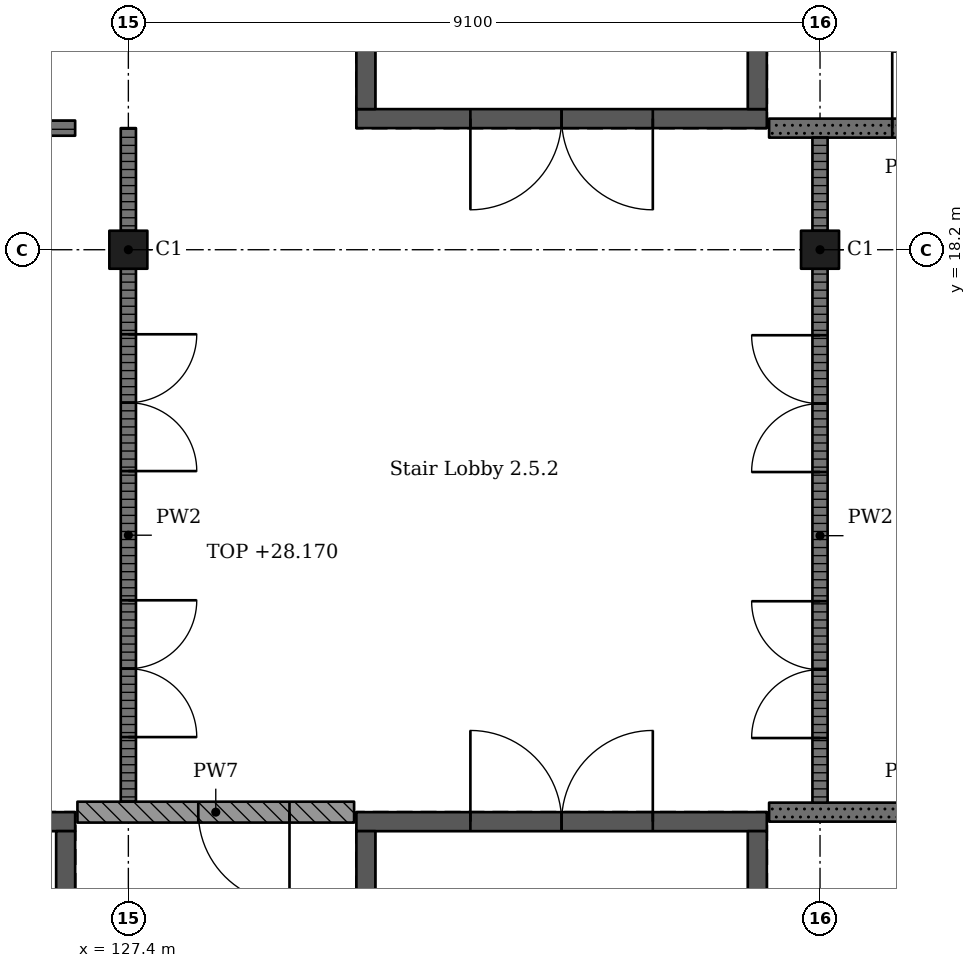
"""IFC4 building model, lengths in metres.
Left out: names, types, materials, properties, quantities, classifications, styles, units other than length and angle.
Written with IfcOpenShell. Run it as: python <this file> out.ifc"""

import sys

from ifc_helpers import new_model, si_unit, direction, frame, frame_2d, origin, origin_2d, place, context, subcontext, project, spatial, rectangle, extrude, element, fill, save


model = new_model("IFC4")
c1 = context("Model", 3, precision=1e-05, world=origin(), true_north=direction((0.0, 1.0)))
c2 = subcontext(c1, "Body", "Model", "MODEL_VIEW")
j1 = project(units=[si_unit("LENGTHUNIT", "METRE"), si_unit("PLANEANGLEUNIT", "RADIAN")], contexts=[c1])
p1 = place(None, origin())
s1 = spatial("IfcSite", under=j1, at=p1, CompositionType="ELEMENT")
p2 = place(p1, origin())
s2 = spatial("IfcBuilding", under=s1, at=p2, CompositionType="ELEMENT")
p3 = place(p2, frame((0.0, 0.0, 24.57)))
s3 = spatial("IfcBuildingStorey", under=s2, at=p3, CompositionType="ELEMENT", Elevation=24.57)
for number, where, z_axis, x_axis in (
    (1, (127.4, 18.2, 0.0), (0.0, 0.0, 1.0), (1.0, 0.0, 0.0)),
    (2, (136.5, 18.2, 0.0), (0.0, 0.0, 1.0), (1.0, 0.0, 0.0)),
):
    element("IfcColumn", number, at=place(p3, frame(where, z_axis=z_axis, x_axis=x_axis)), inside=s3, PredefinedType="COLUMN", context=c2, shape_type="SweptSolid", body=[
        extrude(rectangle(XDim=0.5, YDim=0.5, at=origin_2d()), origin(), (0.0, 0.0, 1.0), 4.55),
    ])
p4 = place(p3, frame((135.8, 10.675, 0.0), z_axis=(0.0, 0.0, 1.0), x_axis=(-1.0, 0.0, 0.0)))
e3 = element("IfcWall", 3, at=p4, inside=s3, PredefinedType="SHEAR", context=c2, shape_type="SweptSolid", body=[
    extrude(rectangle(XDim=5.4, YDim=0.25, at=frame_2d((2.7, 0.0))), origin(), (0.0, 0.0, 1.0), 4.55),
])
p5 = place(p4, frame((1.5, 0.0, 0.0)))
e4 = element("IfcOpeningElement", 4, at=p5, cuts=e3, PredefinedType="OPENING", context=c2, shape_type="SweptSolid", body=[
    extrude(rectangle(XDim=2.4, YDim=2.1, at=frame_2d((1.2, 1.05))), frame((0.0, 0.135, 0.0), z_axis=(0.0, -1.0, 0.0), x_axis=(1.0, 0.0, 0.0)), (0.0, 0.0, 1.0), 0.27),
])
for number, where, z_axis, x_axis in (
    (5, (130.525, 10.55, 0.0), (0.0, 0.0, 1.0), (0.0, -1.0, 0.0)),
    (6, (135.675, 10.55, 0.0), (0.0, 0.0, 1.0), (0.0, -1.0, 0.0)),
):
    element("IfcWall", number, at=place(p3, frame(where, z_axis=z_axis, x_axis=x_axis)), inside=s3, PredefinedType="SHEAR", context=c2, shape_type="SweptSolid", body=[
        extrude(rectangle(XDim=9.6, YDim=0.25, at=frame_2d((4.8, 0.0))), origin(), (0.0, 0.0, 1.0), 4.55),
    ])
p6 = place(p3, frame((126.7, 10.675, 0.0), z_axis=(0.0, 0.0, 1.0), x_axis=(-1.0, 0.0, 0.0)))
e7 = element("IfcWall", 7, at=p6, inside=s3, PredefinedType="SHEAR", context=c2, shape_type="SweptSolid", body=[
    extrude(rectangle(XDim=5.4, YDim=0.25, at=frame_2d((2.7, 0.0))), origin(), (0.0, 0.0, 1.0), 4.55),
])
p7 = place(p6, frame((1.5, 0.0, 0.0)))
e8 = element("IfcOpeningElement", 8, at=p7, cuts=e7, PredefinedType="OPENING", context=c2, shape_type="SweptSolid", body=[
    extrude(rectangle(XDim=2.4, YDim=2.1, at=frame_2d((1.2, 1.05))), frame((0.0, 0.135, 0.0), z_axis=(0.0, -1.0, 0.0), x_axis=(1.0, 0.0, 0.0)), (0.0, 0.0, 1.0), 0.27),
])
p8 = place(p3, frame((126.575, 10.55, 0.0), z_axis=(0.0, 0.0, 1.0), x_axis=(0.0, -1.0, 0.0)))
e9 = element("IfcWall", 9, at=p8, inside=s3, PredefinedType="SHEAR", context=c2, shape_type="SweptSolid", body=[
    extrude(rectangle(XDim=9.6, YDim=0.25, at=frame_2d((4.8, 0.0))), origin(), (0.0, 0.0, 1.0), 4.55),
])
p9 = place(p3, frame((135.8, 19.925, 0.0), z_axis=(0.0, 0.0, 1.0), x_axis=(-1.0, 0.0, 0.0)))
e10 = element("IfcWall", 10, at=p9, inside=s3, PredefinedType="SHEAR", context=c2, shape_type="SweptSolid", body=[
    extrude(rectangle(XDim=5.4, YDim=0.25, at=frame_2d((2.7, 0.0))), origin(), (0.0, 0.0, 1.0), 4.55),
])
p10 = place(p9, frame((1.5, 0.0, 0.0)))
e11 = element("IfcOpeningElement", 11, at=p10, cuts=e10, PredefinedType="OPENING", context=c2, shape_type="SweptSolid", body=[
    extrude(rectangle(XDim=2.4, YDim=2.1, at=frame_2d((1.2, 1.05))), frame((0.0, 0.135, 0.0), z_axis=(0.0, -1.0, 0.0), x_axis=(1.0, 0.0, 0.0)), (0.0, 0.0, 1.0), 0.27),
])
for number, where, z_axis, x_axis in (
    (12, (130.525, 29.65, 0.0), (0.0, 0.0, 1.0), (0.0, -1.0, 0.0)),
    (13, (135.675, 29.65, 0.0), (0.0, 0.0, 1.0), (0.0, -1.0, 0.0)),
):
    element("IfcWall", number, at=place(p3, frame(where, z_axis=z_axis, x_axis=x_axis)), inside=s3, PredefinedType="SHEAR", context=c2, shape_type="SweptSolid", body=[
        extrude(rectangle(XDim=9.6, YDim=0.25, at=frame_2d((4.8, 0.0))), origin(), (0.0, 0.0, 1.0), 4.55),
    ])
p11 = place(p3, frame((121.3, 19.8, 0.0), z_axis=(0.0, 0.0, 1.0), x_axis=(1.0, 0.0, 0.0)))
e14 = element("IfcWall", 14, at=p11, inside=s3, PredefinedType="PARTITIONING", context=c2, shape_type="SweptSolid", body=[
    extrude(rectangle(XDim=5.4, YDim=0.2, at=frame_2d((2.7, 0.0))), origin(), (0.0, 0.0, 1.0), 4.35),
])
p12 = place(p11, frame((1.85, 0.0, 0.0)))
e15 = element("IfcOpeningElement", 15, at=p12, cuts=e14, PredefinedType="OPENING", context=c2, shape_type="SweptSolid", body=[
    extrude(rectangle(XDim=1.8, YDim=2.4, at=frame_2d((0.9, 1.2))), frame((0.0, 0.11, 0.0), z_axis=(0.0, -1.0, 0.0), x_axis=(1.0, 0.0, 0.0)), (0.0, 0.0, 1.0), 0.22),
])
p13 = place(p3, frame((126.73, 10.8, 0.0), z_axis=(0.0, 0.0, 1.0), x_axis=(1.0, 0.0, 0.0)))
e16 = element("IfcWall", 16, at=p13, inside=s3, PredefinedType="SOLIDWALL", context=c2, shape_type="SweptSolid", body=[
    extrude(rectangle(XDim=3.64, YDim=0.275, at=frame_2d((1.82, 0.0))), origin(), (0.0, 0.0, 1.0), 4.35),
])
p14 = place(p13, frame((1.59, 0.0, 0.0)))
e17 = element("IfcOpeningElement", 17, at=p14, cuts=e16, PredefinedType="OPENING", context=c2, shape_type="SweptSolid", body=[
    extrude(rectangle(XDim=1.2, YDim=2.4, at=frame_2d((0.6, 1.2))), frame((0.0, 0.147, 0.0), z_axis=(0.0, -1.0, 0.0), x_axis=(1.0, 0.0, 0.0)), (0.0, 0.0, 1.0), 0.295),
])
p15 = place(p3, frame((127.4, 10.938, 0.0), z_axis=(0.0, 0.0, 1.0), x_axis=(0.0, 1.0, 0.0)))
e18 = element("IfcWall", 18, at=p15, inside=s3, PredefinedType="PARTITIONING", context=c2, shape_type="SweptSolid", body=[
    extrude(rectangle(XDim=7.012, YDim=0.2, at=frame_2d((3.506, 0.0))), origin(), (0.0, 0.0, 1.0), 3.6),
])
p16 = place(p15, frame((0.85, 0.0, 0.0)))
e19 = element("IfcOpeningElement", 19, at=p16, cuts=e18, PredefinedType="OPENING", context=c2, shape_type="SweptSolid", body=[
    extrude(rectangle(XDim=1.8, YDim=2.4, at=frame_2d((0.9, 1.2))), frame((0.0, 0.11, 0.0), z_axis=(0.0, -1.0, 0.0), x_axis=(1.0, 0.0, 0.0)), (0.0, 0.0, 1.0), 0.22),
])
p17 = place(p15, frame((4.35, 0.0, 0.0)))
e20 = element("IfcOpeningElement", 20, at=p17, cuts=e18, PredefinedType="OPENING", context=c2, shape_type="SweptSolid", body=[
    extrude(rectangle(XDim=1.8, YDim=2.4, at=frame_2d((0.9, 1.2))), frame((0.0, 0.11, 0.0), z_axis=(0.0, -1.0, 0.0), x_axis=(1.0, 0.0, 0.0)), (0.0, 0.0, 1.0), 0.22),
])
p18 = place(p3, frame((127.4, 18.45, 0.0), z_axis=(0.0, 0.0, 1.0), x_axis=(0.0, 1.0, 0.0)))
e21 = element("IfcWall", 21, at=p18, inside=s3, PredefinedType="PARTITIONING", context=c2, shape_type="SweptSolid", body=[
    extrude(rectangle(XDim=1.35, YDim=0.2, at=frame_2d((0.675, 0.0))), origin(), (0.0, 0.0, 1.0), 3.6),
])
p19 = place(p3, frame((135.83, 19.8, 0.0), z_axis=(0.0, 0.0, 1.0), x_axis=(1.0, 0.0, 0.0)))
e22 = element("IfcWall", 22, at=p19, inside=s3, PredefinedType="SOLIDWALL", context=c2, shape_type="SweptSolid", body=[
    extrude(rectangle(XDim=3.64, YDim=0.25, at=frame_2d((1.82, 0.0))), origin(), (0.0, 0.0, 1.0), 4.35),
])
p20 = place(p19, frame((1.62, 0.0, 0.0)))
e23 = element("IfcOpeningElement", 23, at=p20, cuts=e22, PredefinedType="OPENING", context=c2, shape_type="SweptSolid", body=[
    extrude(rectangle(XDim=1.0, YDim=2.1, at=frame_2d((0.5, 1.05))), frame((0.0, 0.135, 0.0), z_axis=(0.0, -1.0, 0.0), x_axis=(1.0, 0.0, 0.0)), (0.0, 0.0, 1.0), 0.27),
])
p21 = place(p3, frame((135.83, 10.8, 0.0), z_axis=(0.0, 0.0, 1.0), x_axis=(1.0, 0.0, 0.0)))
e24 = element("IfcWall", 24, at=p21, inside=s3, PredefinedType="SOLIDWALL", context=c2, shape_type="SweptSolid", body=[
    extrude(rectangle(XDim=3.64, YDim=0.25, at=frame_2d((1.82, 0.0))), origin(), (0.0, 0.0, 1.0), 4.35),
])
p22 = place(p21, frame((1.69, 0.0, 0.0)))
e25 = element("IfcOpeningElement", 25, at=p22, cuts=e24, PredefinedType="OPENING", context=c2, shape_type="SweptSolid", body=[
    extrude(rectangle(XDim=1.0, YDim=2.1, at=frame_2d((0.5, 1.05))), frame((0.0, 0.135, 0.0), z_axis=(0.0, -1.0, 0.0), x_axis=(1.0, 0.0, 0.0)), (0.0, 0.0, 1.0), 0.27),
])
p23 = place(p3, frame((136.5, 10.925, 0.0), z_axis=(0.0, 0.0, 1.0), x_axis=(0.0, 1.0, 0.0)))
e26 = element("IfcWall", 26, at=p23, inside=s3, PredefinedType="PARTITIONING", context=c2, shape_type="SweptSolid", body=[
    extrude(rectangle(XDim=7.025, YDim=0.2, at=frame_2d((3.512, 0.0))), origin(), (0.0, 0.0, 1.0), 3.6),
])
p24 = place(p23, frame((0.85, 0.0, 0.0)))
e27 = element("IfcOpeningElement", 27, at=p24, cuts=e26, PredefinedType="OPENING", context=c2, shape_type="SweptSolid", body=[
    extrude(rectangle(XDim=1.8, YDim=2.4, at=frame_2d((0.9, 1.2))), frame((0.0, 0.11, 0.0), z_axis=(0.0, -1.0, 0.0), x_axis=(1.0, 0.0, 0.0)), (0.0, 0.0, 1.0), 0.22),
])
p25 = place(p23, frame((4.35, 0.0, 0.0)))
e28 = element("IfcOpeningElement", 28, at=p25, cuts=e26, PredefinedType="OPENING", context=c2, shape_type="SweptSolid", body=[
    extrude(rectangle(XDim=1.8, YDim=2.4, at=frame_2d((0.9, 1.2))), frame((0.0, 0.11, 0.0), z_axis=(0.0, -1.0, 0.0), x_axis=(1.0, 0.0, 0.0)), (0.0, 0.0, 1.0), 0.22),
])
p26 = place(p3, frame((136.5, 18.45, 0.0), z_axis=(0.0, 0.0, 1.0), x_axis=(0.0, 1.0, 0.0)))
e29 = element("IfcWall", 29, at=p26, inside=s3, PredefinedType="PARTITIONING", context=c2, shape_type="SweptSolid", body=[
    extrude(rectangle(XDim=1.225, YDim=0.2, at=frame_2d((0.613, 0.0))), origin(), (0.0, 0.0, 1.0), 3.6),
])
p27 = place(p20, origin())
e30 = element("IfcDoor", 30, at=p27, inside=s3, OperationType="SINGLE_SWING_RIGHT", PredefinedType="DOOR", context=c2, shape_type="SweptSolid", body=[
    extrude(rectangle(XDim=1.0, YDim=2.1, at=frame_2d((0.5, 1.05))), frame((0.0, 0.025, 0.0), z_axis=(0.0, -1.0, 0.0), x_axis=(1.0, 0.0, 0.0)), (0.0, 0.0, 1.0), 0.05),
])
fill(e23, e30)
p28 = place(p14, origin())
e31 = element("IfcDoor", 31, at=p28, inside=s3, OperationType="SINGLE_SWING_RIGHT", PredefinedType="DOOR", context=c2, shape_type="SweptSolid", body=[
    extrude(rectangle(XDim=1.2, YDim=2.4, at=frame_2d((0.6, 1.2))), frame((0.0, 0.025, 0.0), z_axis=(0.0, -1.0, 0.0), x_axis=(1.0, 0.0, 0.0)), (0.0, 0.0, 1.0), 0.05),
])
fill(e17, e31)
p29 = place(p24, origin())
e32 = element("IfcDoor", 32, at=p29, inside=s3, OperationType="DOUBLE_DOOR_SINGLE_SWING", PredefinedType="DOOR", context=c2, shape_type="SweptSolid", body=[
    extrude(rectangle(XDim=1.8, YDim=2.4, at=frame_2d((0.9, 1.2))), frame((0.0, 0.025, 0.0), z_axis=(0.0, -1.0, 0.0), x_axis=(1.0, 0.0, 0.0)), (0.0, 0.0, 1.0), 0.05),
])
fill(e27, e32)
p30 = place(p25, origin())
e33 = element("IfcDoor", 33, at=p30, inside=s3, OperationType="DOUBLE_DOOR_SINGLE_SWING", PredefinedType="DOOR", context=c2, shape_type="SweptSolid", body=[
    extrude(rectangle(XDim=1.8, YDim=2.4, at=frame_2d((0.9, 1.2))), frame((0.0, 0.025, 0.0), z_axis=(0.0, -1.0, 0.0), x_axis=(1.0, 0.0, 0.0)), (0.0, 0.0, 1.0), 0.05),
])
fill(e28, e33)
p31 = place(p16, origin())
e34 = element("IfcDoor", 34, at=p31, inside=s3, OperationType="DOUBLE_DOOR_SINGLE_SWING", PredefinedType="DOOR", context=c2, shape_type="SweptSolid", body=[
    extrude(rectangle(XDim=1.8, YDim=2.4, at=frame_2d((0.9, 1.2))), frame((0.0, 0.025, 0.0), z_axis=(0.0, -1.0, 0.0), x_axis=(1.0, 0.0, 0.0)), (0.0, 0.0, 1.0), 0.05),
])
fill(e19, e34)
p32 = place(p17, origin())
e35 = element("IfcDoor", 35, at=p32, inside=s3, OperationType="DOUBLE_DOOR_SINGLE_SWING", PredefinedType="DOOR", context=c2, shape_type="SweptSolid", body=[
    extrude(rectangle(XDim=1.8, YDim=2.4, at=frame_2d((0.9, 1.2))), frame((0.0, 0.025, 0.0), z_axis=(0.0, -1.0, 0.0), x_axis=(1.0, 0.0, 0.0)), (0.0, 0.0, 1.0), 0.05),
])
fill(e20, e35)
p33 = place(p5, origin())
e36 = element("IfcDoor", 36, at=p33, inside=s3, OperationType="DOUBLE_DOOR_SINGLE_SWING", PredefinedType="DOOR", context=c2, shape_type="SweptSolid", body=[
    extrude(rectangle(XDim=2.4, YDim=2.1, at=frame_2d((1.2, 1.05))), frame((0.0, 0.025, 0.0), z_axis=(0.0, -1.0, 0.0), x_axis=(1.0, 0.0, 0.0)), (0.0, 0.0, 1.0), 0.05),
])
fill(e4, e36)
p34 = place(p10, origin())
e37 = element("IfcDoor", 37, at=p34, inside=s3, OperationType="DOUBLE_DOOR_SINGLE_SWING", PredefinedType="DOOR", context=c2, shape_type="SweptSolid", body=[
    extrude(rectangle(XDim=2.4, YDim=2.1, at=frame_2d((1.2, 1.05))), frame((0.0, 0.025, 0.0), z_axis=(0.0, -1.0, 0.0), x_axis=(1.0, 0.0, 0.0)), (0.0, 0.0, 1.0), 0.05),
])
fill(e11, e37)
save(model, sys.argv[1])
